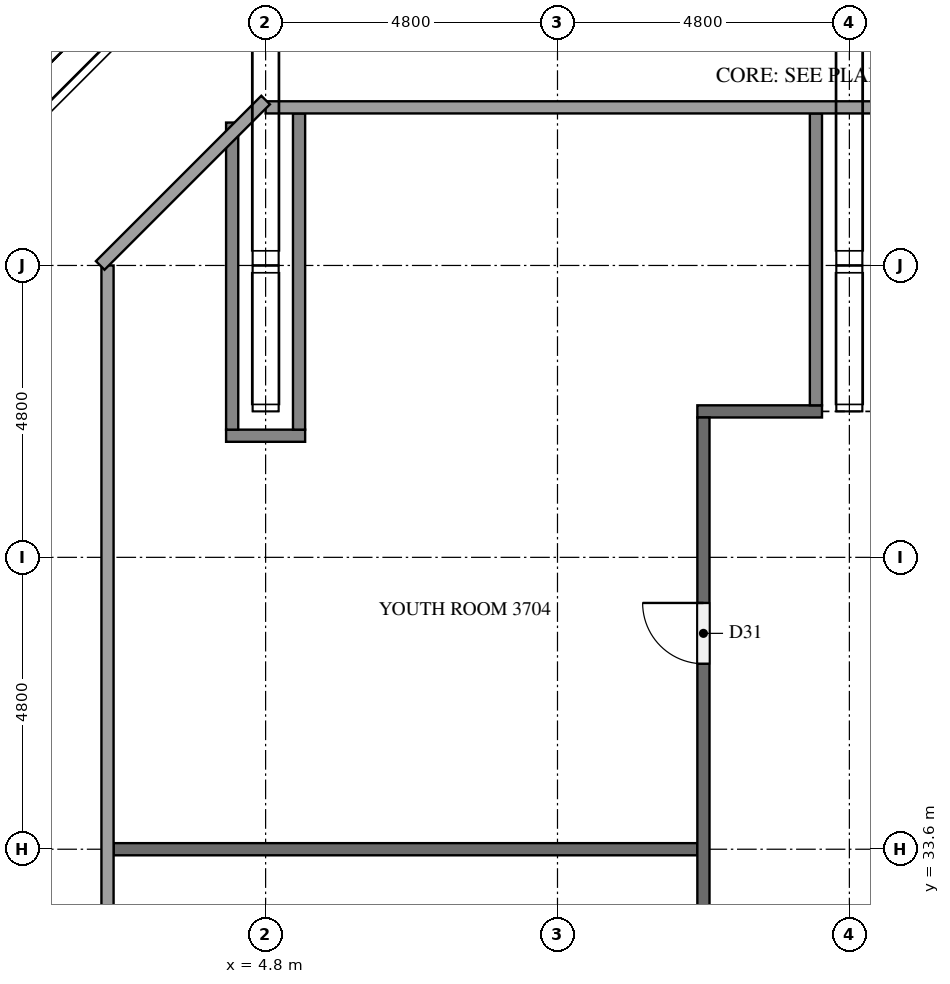
"""IFC4 building model, lengths in metres.
Left out: names, types, materials, properties, quantities, classifications, styles, units other than length and angle.
Written with IfcOpenShell. Run it as: python <this file> out.ifc"""

import sys

from ifc_helpers import new_model, si_unit, direction, frame, frame_2d, origin, place, context, subcontext, project, spatial, rectangle, extrude, element, fill, save


model = new_model("IFC4")
c1 = context("Model", 3, precision=1e-05, world=origin(), true_north=direction((0.0, 1.0)))
c2 = subcontext(c1, "Body", "Model", "MODEL_VIEW")
j1 = project(units=[si_unit("LENGTHUNIT", "METRE"), si_unit("PLANEANGLEUNIT", "RADIAN")], contexts=[c1])
p1 = place(None, origin())
s1 = spatial("IfcSite", under=j1, at=p1, CompositionType="ELEMENT")
p2 = place(p1, origin())
s2 = spatial("IfcBuilding", under=s1, at=p2, CompositionType="ELEMENT")
p3 = place(p2, frame((0.0, 0.0, 143.6)))
s3 = spatial("IfcBuildingStorey", under=s2, at=p3, CompositionType="ELEMENT", Elevation=143.6)
p4 = place(p3, frame((2.3, 33.6, 0.0), z_axis=(0.0, 0.0, 1.0), x_axis=(1.0, 0.0, 0.0)))
e1 = element("IfcWall", 1, at=p4, inside=s3, PredefinedType="PARTITIONING", context=c2, shape_type="SweptSolid", body=[
    extrude(rectangle(XDim=9.6, YDim=0.2, at=frame_2d((4.8, 0.0))), origin(), (0.0, 0.0, 1.0), 5.1),
])
p5 = place(p3, frame((4.15, 40.4, 0.0), z_axis=(0.0, 0.0, 1.0), x_axis=(1.0, 0.0, 0.0)))
e2 = element("IfcWall", 2, at=p5, inside=s3, PredefinedType="PARTITIONING", context=c2, shape_type="SweptSolid", body=[
    extrude(rectangle(XDim=1.3, YDim=0.2, at=frame_2d((0.65, 0.0))), origin(), (0.0, 0.0, 1.0), 5.1),
])
p6 = place(p3, frame((11.9, 40.8, 0.0), z_axis=(0.0, 0.0, 1.0), x_axis=(1.0, 0.0, 0.0)))
e3 = element("IfcWall", 3, at=p6, inside=s3, PredefinedType="PARTITIONING", context=c2, shape_type="SweptSolid", body=[
    extrude(rectangle(XDim=2.05, YDim=0.2, at=frame_2d((1.025, 0.0))), origin(), (0.0, 0.0, 1.0), 5.1),
])
p7 = place(p3, frame((4.25, 40.5, 0.0), z_axis=(0.0, 0.0, 1.0), x_axis=(0.0, 1.0, 0.0)))
e4 = element("IfcWall", 4, at=p7, inside=s3, PredefinedType="PARTITIONING", context=c2, shape_type="SweptSolid", body=[
    extrude(rectangle(XDim=5.05, YDim=0.2, at=frame_2d((2.525, 0.0))), origin(), (0.0, 0.0, 1.0), 5.1),
])
p8 = place(p3, frame((5.35, 40.5, 0.0), z_axis=(0.0, 0.0, 1.0), x_axis=(0.0, 1.0, 0.0)))
e5 = element("IfcWall", 5, at=p8, inside=s3, PredefinedType="PARTITIONING", context=c2, shape_type="SweptSolid", body=[
    extrude(rectangle(XDim=5.2, YDim=0.2, at=frame_2d((2.6, 0.0))), origin(), (0.0, 0.0, 1.0), 5.1),
])
p9 = place(p3, frame((12.0, 12.1, 0.0), z_axis=(0.0, 0.0, 1.0), x_axis=(0.0, 1.0, 0.0)))
e6 = element("IfcWall", 6, at=p9, inside=s3, PredefinedType="PARTITIONING", context=c2, shape_type="SweptSolid", body=[
    extrude(rectangle(XDim=28.6, YDim=0.2, at=frame_2d((14.3, 0.0))), origin(), (0.0, 0.0, 1.0), 5.1),
])
p10 = place(p9, frame((5.45, 0.0, 0.0)))
e7 = element("IfcOpeningElement", 7, at=p10, cuts=e6, PredefinedType="OPENING", context=c2, shape_type="SweptSolid", body=[
    extrude(rectangle(XDim=1.0, YDim=2.1, at=frame_2d((0.5, 1.05))), frame((0.0, 0.11, 0.0), z_axis=(0.0, -1.0, 0.0), x_axis=(1.0, 0.0, 0.0)), (0.0, 0.0, 1.0), 0.22),
])
p11 = place(p9, frame((13.85, 0.0, 0.0)))
e8 = element("IfcOpeningElement", 8, at=p11, cuts=e6, PredefinedType="OPENING", context=c2, shape_type="SweptSolid", body=[
    extrude(rectangle(XDim=1.0, YDim=2.1, at=frame_2d((0.5, 1.05))), frame((0.0, 0.11, 0.0), z_axis=(0.0, -1.0, 0.0), x_axis=(1.0, 0.0, 0.0)), (0.0, 0.0, 1.0), 0.22),
])
p12 = place(p9, frame((18.65, 0.0, 0.0)))
e9 = element("IfcOpeningElement", 9, at=p12, cuts=e6, PredefinedType="OPENING", context=c2, shape_type="SweptSolid", body=[
    extrude(rectangle(XDim=1.0, YDim=2.1, at=frame_2d((0.5, 1.05))), frame((0.0, 0.11, 0.0), z_axis=(0.0, -1.0, 0.0), x_axis=(1.0, 0.0, 0.0)), (0.0, 0.0, 1.0), 0.22),
])
p13 = place(p9, frame((24.55, 0.0, 0.0)))
e10 = element("IfcOpeningElement", 10, at=p13, cuts=e6, PredefinedType="OPENING", context=c2, shape_type="SweptSolid", body=[
    extrude(rectangle(XDim=1.0, YDim=2.1, at=frame_2d((0.5, 1.05))), frame((0.0, 0.11, 0.0), z_axis=(0.0, -1.0, 0.0), x_axis=(1.0, 0.0, 0.0)), (0.0, 0.0, 1.0), 0.22),
])
p14 = place(p3, frame((13.85, 40.9, 0.0), z_axis=(0.0, 0.0, 1.0), x_axis=(0.0, 1.0, 0.0)))
e11 = element("IfcWall", 11, at=p14, inside=s3, PredefinedType="PARTITIONING", context=c2, shape_type="SweptSolid", body=[
    extrude(rectangle(XDim=4.8, YDim=0.2, at=frame_2d((2.4, 0.0))), origin(), (0.0, 0.0, 1.0), 5.1),
])
p15 = place(p13, origin())
e12 = element("IfcDoor", 12, at=p15, inside=s3, OperationType="SINGLE_SWING_RIGHT", PredefinedType="DOOR", context=c2, shape_type="SweptSolid", body=[
    extrude(rectangle(XDim=1.0, YDim=2.1, at=frame_2d((0.5, 1.05))), frame((0.0, 0.025, 0.0), z_axis=(0.0, -1.0, 0.0), x_axis=(1.0, 0.0, 0.0)), (0.0, 0.0, 1.0), 0.05),
])
fill(e10, e12)
save(model, sys.argv[1])
